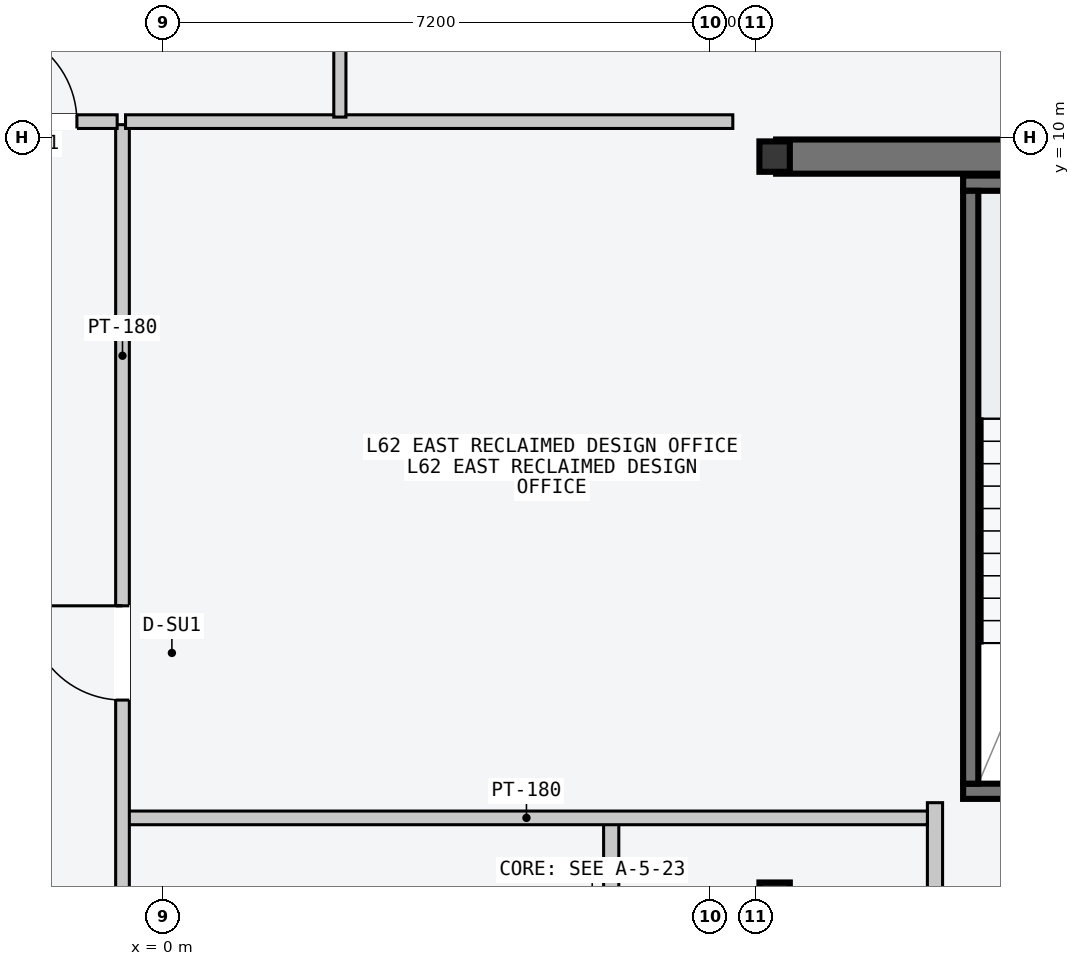
"""IFC4 building model, lengths in metres.
Left out: names, types, materials, properties, quantities, classifications, styles, units other than length and angle.
Written with IfcOpenShell. Run it as: python <this file> out.ifc"""

import sys

from ifc_helpers import new_model, si_unit, direction, frame, frame_2d, origin, origin_2d, place, context, subcontext, project, spatial, rectangle, i_section, extrude, element, fill, save


model = new_model("IFC4")
c1 = context("Model", 3, precision=1e-05, world=origin(), true_north=direction((0.0, 1.0)))
c2 = subcontext(c1, "Body", "Model", "MODEL_VIEW")
j1 = project(units=[si_unit("LENGTHUNIT", "METRE"), si_unit("PLANEANGLEUNIT", "RADIAN")], contexts=[c1])
p1 = place(None, origin())
s1 = spatial("IfcSite", under=j1, at=p1, CompositionType="ELEMENT")
p2 = place(p1, origin())
s2 = spatial("IfcBuilding", under=s1, at=p2, CompositionType="ELEMENT")
p3 = place(p2, frame((0.0, 0.0, 236.4)))
s3 = spatial("IfcBuildingStorey", under=s2, at=p3, CompositionType="ELEMENT", Elevation=236.4)
p4 = place(p3, frame((8.07, 9.75, -0.2), z_axis=(0.0, 0.0, 1.0), x_axis=(1.0, 0.0, 0.0)))
e1 = element("IfcWall", 1, at=p4, inside=s3, PredefinedType="SHEAR", context=c2, shape_type="SweptSolid", body=[
    extrude(rectangle(XDim=6.46, YDim=0.45, at=frame_2d((3.23, 0.0))), origin(), (0.0, 0.0, 1.0), 3.6),
])
p5 = place(p3, frame((10.53, 1.4, -0.2), z_axis=(0.0, 0.0, 1.0), x_axis=(1.0, 0.0, 0.0)))
e2 = element("IfcWall", 2, at=p5, inside=s3, PredefinedType="SOLIDWALL", context=c2, shape_type="SweptSolid", body=[
    extrude(rectangle(XDim=3.72, YDim=0.2, at=frame_2d((1.86, 0.0))), origin(), (0.0, 0.0, 1.0), 3.6),
])
p6 = place(p5, frame((1.5, 0.0, 0.2)))
e3 = element("IfcOpeningElement", 3, at=p6, cuts=e2, PredefinedType="OPENING", context=c2, shape_type="SweptSolid", body=[
    extrude(rectangle(XDim=1.12, YDim=2.18, at=frame_2d((0.56, 1.09))), frame((0.0, 0.11, 0.0), z_axis=(0.0, -1.0, 0.0), x_axis=(1.0, 0.0, 0.0)), (0.0, 0.0, 1.0), 0.22),
])
p7 = place(p3, frame((10.53, 9.4, -0.2), z_axis=(0.0, 0.0, 1.0), x_axis=(1.0, 0.0, 0.0)))
e4 = element("IfcWall", 4, at=p7, inside=s3, PredefinedType="SOLIDWALL", context=c2, shape_type="SweptSolid", body=[
    extrude(rectangle(XDim=3.72, YDim=0.2, at=frame_2d((1.86, 0.0))), origin(), (0.0, 0.0, 1.0), 3.6),
])
p8 = place(p3, frame((10.63, 1.5, -0.2), z_axis=(0.0, 0.0, 1.0), x_axis=(0.0, 1.0, 0.0)))
e5 = element("IfcWall", 5, at=p8, inside=s3, PredefinedType="SOLIDWALL", context=c2, shape_type="SweptSolid", body=[
    extrude(rectangle(XDim=7.8, YDim=0.2, at=frame_2d((3.9, 0.0))), origin(), (0.0, 0.0, 1.0), 3.6),
])
for number, where, z_axis, x_axis in (
    (6, (8.05, 0.0, 0.0), (0.0, 0.0, 1.0), (1.0, 0.0, 0.0)),
    (7, (8.05, 9.75, 0.0), (0.0, 0.0, 1.0), (1.0, 0.0, 0.0)),
):
    element("IfcColumn", number, at=place(p3, frame(where, z_axis=z_axis, x_axis=x_axis)), inside=s3, PredefinedType="COLUMN", context=c2, shape_type="SweptSolid", body=[
        extrude(i_section(OverallWidth=0.4, OverallDepth=0.4, WebThickness=0.013, FlangeThickness=0.021, at=origin_2d()), origin(), (0.0, 0.0, 1.0), 3.6),
    ])
p9 = place(p3, frame((5.9, -9.45, 0.0), z_axis=(0.0, 0.0, 1.0), x_axis=(0.0, 1.0, 0.0)))
e8 = element("IfcWall", 8, at=p9, inside=s3, PredefinedType="PARTITIONING", context=c2, shape_type="SweptSolid", body=[
    extrude(rectangle(XDim=10.5, YDim=0.2, at=frame_2d((5.25, 0.0))), origin(), (0.0, 0.0, 1.0), 3.4),
])
p10 = place(p9, frame((3.9, 0.0, 0.0)))
e9 = element("IfcOpeningElement", 9, at=p10, cuts=e8, PredefinedType="OPENING", context=c2, shape_type="SweptSolid", body=[
    extrude(rectangle(XDim=1.5, YDim=2.2, at=frame_2d((0.75, 1.1))), frame((0.0, 0.11, 0.0), z_axis=(0.0, -1.0, 0.0), x_axis=(1.0, 0.0, 0.0)), (0.0, 0.0, 1.0), 0.22),
])
p11 = place(p3, frame((10.16, -2.55, 0.0), z_axis=(0.0, 0.0, 1.0), x_axis=(0.0, 1.0, 0.0)))
e10 = element("IfcWall", 10, at=p11, inside=s3, PredefinedType="PARTITIONING", context=c2, shape_type="SweptSolid", body=[
    extrude(rectangle(XDim=3.8, YDim=0.2, at=frame_2d((1.9, 0.0))), origin(), (0.0, 0.0, 1.0), 3.4),
])
p12 = place(p11, frame((1.3, 0.0, 0.0)))
e11 = element("IfcOpeningElement", 11, at=p12, cuts=e10, PredefinedType="OPENING", context=c2, shape_type="SweptSolid", body=[
    extrude(rectangle(XDim=1.1, YDim=2.15, at=frame_2d((0.55, 1.075))), frame((0.0, 0.11, 0.0), z_axis=(0.0, -1.0, 0.0), x_axis=(1.0, 0.0, 0.0)), (0.0, 0.0, 1.0), 0.22),
])
p13 = place(p3, frame((-0.49, 1.05, 0.0), z_axis=(0.0, 0.0, 1.0), x_axis=(1.0, 0.0, 0.0)))
e12 = element("IfcWall", 12, at=p13, inside=s3, PredefinedType="PARTITIONING", context=c2, shape_type="SweptSolid", body=[
    extrude(rectangle(XDim=10.55, YDim=0.18, at=frame_2d((5.275, 0.0))), origin(), (0.0, 0.0, 1.0), 3.4),
])
p14 = place(p3, frame((-0.53, -3.5, 0.0), z_axis=(0.0, 0.0, 1.0), x_axis=(0.0, 1.0, 0.0)))
e13 = element("IfcWall", 13, at=p14, inside=s3, PredefinedType="PARTITIONING", context=c2, shape_type="SweptSolid", body=[
    extrude(rectangle(XDim=13.67, YDim=0.18, at=frame_2d((6.835, 0.0))), origin(), (0.0, 0.0, 1.0), 3.4),
])
p15 = place(p14, frame((6.1, 0.0, 0.0)))
e14 = element("IfcOpeningElement", 14, at=p15, cuts=e13, PredefinedType="OPENING", context=c2, shape_type="SweptSolid", body=[
    extrude(rectangle(XDim=1.24, YDim=2.24, at=frame_2d((0.62, 1.12))), frame((0.0, 0.1, 0.0), z_axis=(0.0, -1.0, 0.0), x_axis=(1.0, 0.0, 0.0)), (0.0, 0.0, 1.0), 0.2),
])
p16 = place(p14, frame((1.6, 0.0, 0.0)))
e15 = element("IfcOpeningElement", 15, at=p16, cuts=e13, PredefinedType="OPENING", context=c2, shape_type="SweptSolid", body=[
    extrude(rectangle(XDim=0.96, YDim=2.18, at=frame_2d((0.48, 1.09))), frame((0.0, 0.1, 0.0), z_axis=(0.0, -1.0, 0.0), x_axis=(1.0, 0.0, 0.0)), (0.0, 0.0, 1.0), 0.2),
])
p17 = place(p3, frame((-0.49, 10.21, 0.0), z_axis=(0.0, 0.0, 1.0), x_axis=(1.0, 0.0, 0.0)))
e16 = element("IfcWall", 16, at=p17, inside=s3, PredefinedType="PARTITIONING", context=c2, shape_type="SweptSolid", body=[
    extrude(rectangle(XDim=7.99, YDim=0.18, at=frame_2d((3.995, 0.0))), origin(), (0.0, 0.0, 1.0), 3.4),
])
p18 = place(p3, frame((2.33, 10.27, 0.0), z_axis=(0.0, 0.0, 1.0), x_axis=(0.0, 1.0, 0.0)))
e17 = element("IfcWall", 17, at=p18, inside=s3, PredefinedType="PARTITIONING", context=c2, shape_type="SweptSolid", body=[
    extrude(rectangle(XDim=6.28, YDim=0.16, at=frame_2d((3.14, 0.0))), origin(), (0.0, 0.0, 1.0), 3.4),
])
p19 = place(p18, frame((1.15, 0.0, 0.0)))
e18 = element("IfcOpeningElement", 18, at=p19, cuts=e17, PredefinedType="OPENING", context=c2, shape_type="SweptSolid", body=[
    extrude(rectangle(XDim=0.96, YDim=2.18, at=frame_2d((0.48, 1.09))), frame((0.0, 0.09, 0.0), z_axis=(0.0, -1.0, 0.0), x_axis=(1.0, 0.0, 0.0)), (0.0, 0.0, 1.0), 0.18),
])
p20 = place(p3, frame((-2.9, 10.21, 0.0), z_axis=(0.0, 0.0, 1.0), x_axis=(1.0, 0.0, 0.0)))
e19 = element("IfcWall", 19, at=p20, inside=s3, PredefinedType="PARTITIONING", context=c2, shape_type="SweptSolid", body=[
    extrude(rectangle(XDim=2.3, YDim=0.18, at=frame_2d((1.15, 0.0))), origin(), (0.0, 0.0, 1.0), 3.4),
])
p21 = place(p20, frame((0.53, 0.0, 0.0)))
e20 = element("IfcOpeningElement", 20, at=p21, cuts=e19, PredefinedType="OPENING", context=c2, shape_type="SweptSolid", body=[
    extrude(rectangle(XDim=1.24, YDim=2.24, at=frame_2d((0.62, 1.12))), frame((0.0, 0.1, 0.0), z_axis=(0.0, -1.0, 0.0), x_axis=(1.0, 0.0, 0.0)), (0.0, 0.0, 1.0), 0.2),
])
p22 = place(p15, origin())
e21 = element("IfcDoor", 21, at=p22, inside=s3, OperationType="SINGLE_SWING_RIGHT", PredefinedType="DOOR", context=c2, shape_type="SweptSolid", body=[
    extrude(rectangle(XDim=1.24, YDim=2.24, at=frame_2d((0.62, 1.12))), frame((0.0, 0.025, 0.0), z_axis=(0.0, -1.0, 0.0), x_axis=(1.0, 0.0, 0.0)), (0.0, 0.0, 1.0), 0.05),
])
fill(e14, e21)
p23 = place(p21, origin())
e22 = element("IfcDoor", 22, at=p23, inside=s3, OperationType="SINGLE_SWING_LEFT", PredefinedType="DOOR", context=c2, shape_type="SweptSolid", body=[
    extrude(rectangle(XDim=1.24, YDim=2.24, at=frame_2d((0.62, 1.12))), frame((0.0, 0.025, 0.0), z_axis=(0.0, -1.0, 0.0), x_axis=(1.0, 0.0, 0.0)), (0.0, 0.0, 1.0), 0.05),
])
fill(e20, e22)
save(model, sys.argv[1])
